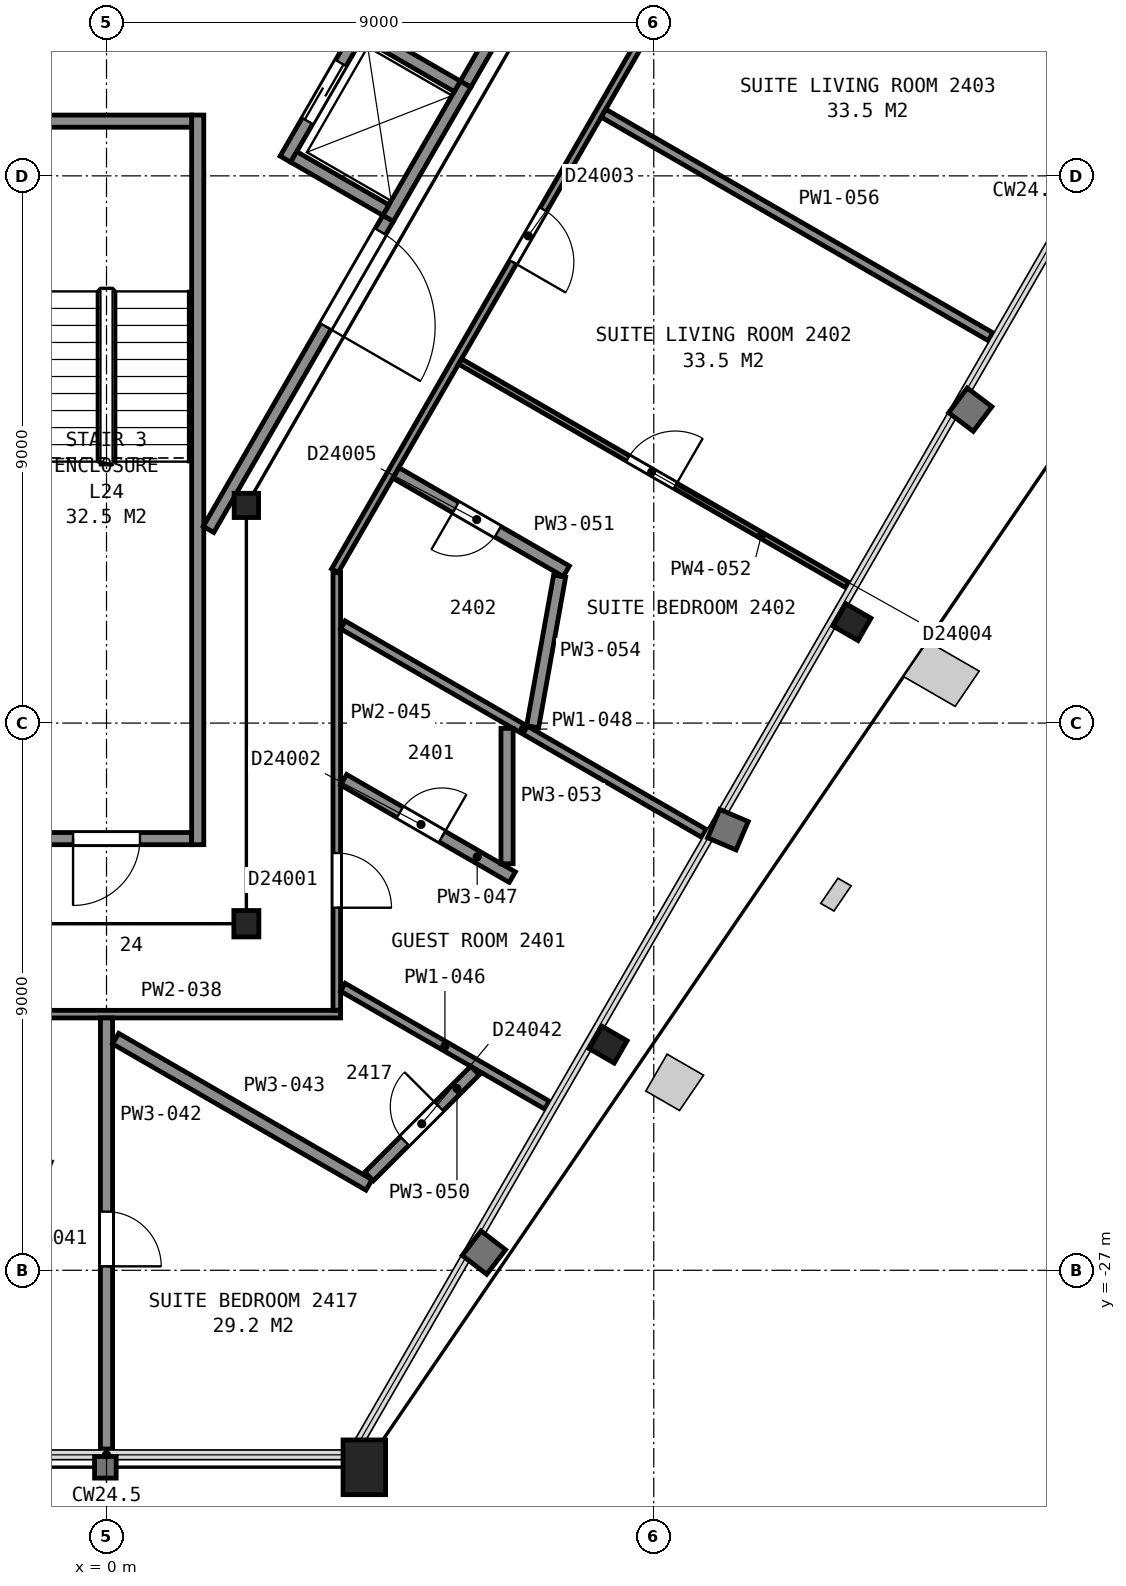
"""IFC4 building model, lengths in metres.
Left out: names, types, materials, properties, quantities, classifications, styles, units other than length and angle.
Written with IfcOpenShell. Run it as: python <this file> out.ifc"""

import sys

from ifc_helpers import new_model, si_unit, direction, frame, frame_2d, origin, origin_2d, place, context, subcontext, project, spatial, rectangle, hollow_rectangle, i_section, extrude, element, fill, save


model = new_model("IFC4")
c1 = context("Model", 3, precision=1e-05, world=origin(), true_north=direction((0.0, 1.0)))
c2 = subcontext(c1, "Body", "Model", "MODEL_VIEW")
j1 = project(units=[si_unit("LENGTHUNIT", "METRE"), si_unit("PLANEANGLEUNIT", "RADIAN")], contexts=[c1])
p1 = place(None, origin())
s1 = spatial("IfcSite", under=j1, at=p1, CompositionType="ELEMENT")
p2 = place(p1, origin())
s2 = spatial("IfcBuilding", under=s1, at=p2, CompositionType="ELEMENT")
p3 = place(p2, frame((0.0, 0.0, 103.6)))
s3 = spatial("IfcBuildingStorey", under=s2, at=p3, CompositionType="ELEMENT", Elevation=103.6)
p4 = place(p3, frame((4.24, -30.24, 0.075), z_axis=(0.0, 0.0, 1.0), x_axis=(-1.0, 0.0, 0.0)))
e1 = element("IfcColumn", 1, at=p4, inside=s3, PredefinedType="COLUMN", context=c2, shape_type="SweptSolid", body=[
    extrude(hollow_rectangle(XDim=0.7, YDim=0.9, WallThickness=0.065, at=origin_2d()), origin(), (0.0, 0.0, 1.0), 3.525),
])
p5 = place(p3, frame((8.25, -23.29, 0.045), z_axis=(0.0, 0.0, 1.0), x_axis=(-0.5, -0.866025403784, 0.0)))
e2 = element("IfcColumn", 2, at=p5, inside=s3, PredefinedType="COLUMN", context=c2, shape_type="SweptSolid", body=[
    extrude(i_section(OverallWidth=0.424, OverallDepth=0.475, WebThickness=0.048, FlangeThickness=0.077, FilletRadius=0.015, at=origin_2d()), origin(), (0.0, 0.0, 1.0), 3.555),
])
p6 = place(p3, frame((12.26, -16.34, 0.04), z_axis=(0.0, 0.0, 1.0), x_axis=(-0.5, -0.866025403784, 0.0)))
e3 = element("IfcColumn", 3, at=p6, inside=s3, PredefinedType="COLUMN", context=c2, shape_type="SweptSolid", body=[
    extrude(i_section(OverallWidth=0.424, OverallDepth=0.475, WebThickness=0.048, FlangeThickness=0.077, FilletRadius=0.015, at=origin_2d()), origin(), (0.0, 0.0, 1.0), 3.56),
])
p7 = place(p3, frame((2.3, -21.3, 0.0), z_axis=(0.0, 0.0, 1.0), x_axis=(-1.0, 0.0, 0.0)))
e4 = element("IfcColumn", 4, at=p7, inside=s3, PredefinedType="COLUMN", context=c2, shape_type="SweptSolid", body=[
    extrude(i_section(OverallWidth=0.411, OverallDepth=0.434, WebThickness=0.036, FlangeThickness=0.057, FilletRadius=0.015, at=origin_2d()), origin(), (0.0, 0.0, 1.0), 3.6),
])
p8 = place(p3, frame((2.3, -14.42, 0.0), z_axis=(0.0, 0.0, 1.0), x_axis=(1.0, 0.0, 0.0)))
e5 = element("IfcColumn", 5, at=p8, inside=s3, PredefinedType="COLUMN", context=c2, shape_type="SweptSolid", body=[
    extrude(i_section(OverallWidth=0.401, OverallDepth=0.399, WebThickness=0.025, FlangeThickness=0.04, FilletRadius=0.015, at=origin_2d()), origin(), (0.0, 0.0, 1.0), 3.6),
])
p9 = place(p3, frame((-1.4, -19.9, 0.0), z_axis=(0.0, 0.0, 1.0), x_axis=(1.0, 0.0, 0.0)))
e6 = element("IfcWall", 6, at=p9, inside=s3, PredefinedType="PARTITIONING", context=c2, shape_type="SweptSolid", body=[
    extrude(rectangle(XDim=2.8, YDim=0.2, at=frame_2d((1.4, 0.0))), origin(), (0.0, 0.0, 1.0), 3.35),
])
p10 = place(p9, frame((0.85, 0.0, 0.0)))
e7 = element("IfcOpeningElement", 7, at=p10, cuts=e6, PredefinedType="OPENING", context=c2, shape_type="SweptSolid", body=[
    extrude(rectangle(XDim=1.1, YDim=2.1, at=frame_2d((0.55, 1.05))), frame((0.0, 0.11, 0.0), z_axis=(0.0, -1.0, 0.0), x_axis=(1.0, 0.0, 0.0)), (0.0, 0.0, 1.0), 0.22),
])
p11 = place(p3, frame((1.5, -8.0, 0.0), z_axis=(0.0, 0.0, 1.0), x_axis=(0.0, -1.0, 0.0)))
e8 = element("IfcWall", 8, at=p11, inside=s3, PredefinedType="PARTITIONING", context=c2, shape_type="SweptSolid", body=[
    extrude(rectangle(XDim=12.0, YDim=0.2, at=frame_2d((6.0, 0.0))), origin(), (0.0, 0.0, 1.0), 3.35),
])
p12 = place(p3, frame((-1.4, -8.1, 0.0), z_axis=(0.0, 0.0, 1.0), x_axis=(1.0, 0.0, 0.0)))
e9 = element("IfcWall", 9, at=p12, inside=s3, PredefinedType="PARTITIONING", context=c2, shape_type="SweptSolid", body=[
    extrude(rectangle(XDim=2.8, YDim=0.2, at=frame_2d((1.4, 0.0))), origin(), (0.0, 0.0, 1.0), 3.35),
])
p13 = place(p3, frame((4.63, -9.7, 0.0), z_axis=(0.0, 0.0, 1.0), x_axis=(0.500062241894, 0.865989465428, 0.0)))
e10 = element("IfcWall", 10, at=p13, inside=s3, PredefinedType="PARTITIONING", context=c2, shape_type="SweptSolid", body=[
    extrude(rectangle(XDim=2.55, YDim=0.2, at=frame_2d((1.275, 0.0))), origin(), (0.0, 0.0, 1.0), 3.6),
])
p14 = place(p3, frame((2.942, -8.725, 0.0), z_axis=(0.0, 0.0, 1.0), x_axis=(0.500020783669, 0.866013403995, 0.0)))
e11 = element("IfcWall", 11, at=p14, inside=s3, PredefinedType="PARTITIONING", context=c2, shape_type="SweptSolid", body=[
    extrude(rectangle(XDim=2.55, YDim=0.2, at=frame_2d((1.275, 0.0))), origin(), (0.0, 0.0, 1.0), 3.6),
])
p15 = place(p14, frame((0.725, 0.0, 0.0)))
e12 = element("IfcOpeningElement", 12, at=p15, cuts=e11, PredefinedType="OPENING", context=c2, shape_type="SweptSolid", body=[
    extrude(rectangle(XDim=1.1, YDim=2.1, at=frame_2d((0.55, 1.05))), frame((0.0, 0.11, 0.0), z_axis=(0.0, -1.0, 0.0), x_axis=(1.0, 0.0, 0.0)), (0.0, 0.0, 1.0), 0.22),
])
p16 = place(p3, frame((5.769, -7.528, 0.0), z_axis=(0.0, 0.0, 1.0), x_axis=(-0.866002029911, 0.500040482552, 0.0)))
e13 = element("IfcWall", 13, at=p16, inside=s3, PredefinedType="PARTITIONING", context=c2, shape_type="SweptSolid", body=[
    extrude(rectangle(XDim=1.75, YDim=0.2, at=frame_2d((0.875, 0.0))), origin(), (0.0, 0.0, 1.0), 3.6),
])
p17 = place(p3, frame((4.594, -9.563, 0.0), z_axis=(0.0, 0.0, 1.0), x_axis=(-0.866036909293, 0.499980071345, 0.0)))
e14 = element("IfcWall", 14, at=p17, inside=s3, PredefinedType="PARTITIONING", context=c2, shape_type="SweptSolid", body=[
    extrude(rectangle(XDim=1.75, YDim=0.2, at=frame_2d((0.875, 0.0))), origin(), (0.0, 0.0, 1.0), 3.6),
])
p18 = place(p3, frame((1.677, -14.815, 0.0), z_axis=(0.0, 0.0, 1.0), x_axis=(0.49999445743, 0.866028603765, 0.0)))
e15 = element("IfcWall", 15, at=p18, inside=s3, PredefinedType="PARTITIONING", context=c2, shape_type="SweptSolid", body=[
    extrude(rectangle(XDim=5.905, YDim=0.2, at=frame_2d((2.952, 0.0))), origin(), (0.0, 0.0, 1.0), 3.35),
])
p19 = place(p18, frame((3.855, 0.0, 0.0)))
e16 = element("IfcOpeningElement", 16, at=p19, cuts=e15, PredefinedType="OPENING", context=c2, shape_type="SweptSolid", body=[
    extrude(rectangle(XDim=1.8, YDim=2.1, at=frame_2d((0.9, 1.05))), frame((0.0, 0.11, 0.0), z_axis=(0.0, -1.0, 0.0), x_axis=(1.0, 0.0, 0.0)), (0.0, 0.0, 1.0), 0.22),
])
p20 = place(p3, frame((5.906, -7.49, 0.0), z_axis=(0.0, 0.0, 1.0), x_axis=(0.500252727967, 0.865879442048, 0.0)))
e17 = element("IfcWall", 17, at=p20, inside=s3, PredefinedType="PARTITIONING", context=c2, shape_type="SweptSolid", body=[
    extrude(rectangle(XDim=2.617, YDim=0.2, at=frame_2d((1.309, 0.0))), origin(), (0.0, 0.0, 1.0), 3.35),
])
p21 = place(p3, frame((3.85, -22.787, 0.0), z_axis=(0.0, 0.0, 1.0), x_axis=(-1.0, 0.0, 0.0)))
e18 = element("IfcWall", 18, at=p21, inside=s3, PredefinedType="PARTITIONING", context=c2, shape_type="SweptSolid", body=[
    extrude(rectangle(XDim=7.699, YDim=0.125, at=frame_2d((3.85, 0.0))), origin(), (0.0, 0.0, 1.0), 2.613),
])
p22 = place(p21, frame((5.237, 0.0, 0.0)))
e19 = element("IfcOpeningElement", 19, at=p22, cuts=e18, PredefinedType="OPENING", context=c2, shape_type="SweptSolid", body=[
    extrude(rectangle(XDim=1.0, YDim=2.1, at=frame_2d((0.5, 1.05))), frame((0.0, 0.073, 0.0), z_axis=(0.0, -1.0, 0.0), x_axis=(1.0, 0.0, 0.0)), (0.0, 0.0, 1.0), 0.145),
])
p23 = place(p3, frame((0.0, -22.85, 0.0), z_axis=(0.0, 0.0, 1.0), x_axis=(0.0, -1.0, 0.0)))
e20 = element("IfcWall", 20, at=p23, inside=s3, PredefinedType="PARTITIONING", context=c2, shape_type="SweptSolid", body=[
    extrude(rectangle(XDim=7.089, YDim=0.2, at=frame_2d((3.545, 0.0))), origin(), (0.0, 0.0, 1.0), 2.613),
])
p24 = place(p23, frame((3.186, 0.0, 0.0)))
e21 = element("IfcOpeningElement", 21, at=p24, cuts=e20, PredefinedType="OPENING", context=c2, shape_type="SweptSolid", body=[
    extrude(rectangle(XDim=0.9, YDim=2.1, at=frame_2d((0.45, 1.05))), frame((0.0, 0.11, 0.0), z_axis=(0.0, -1.0, 0.0), x_axis=(1.0, 0.0, 0.0)), (0.0, 0.0, 1.0), 0.22),
])
p25 = place(p3, frame((0.15, -23.19, 0.0), z_axis=(0.0, 0.0, 1.0), x_axis=(0.866061372545, -0.499937695103, 0.0)))
e22 = element("IfcWall", 22, at=p25, inside=s3, PredefinedType="PARTITIONING", context=c2, shape_type="SweptSolid", body=[
    extrude(rectangle(XDim=4.811, YDim=0.2, at=frame_2d((2.406, 0.0))), origin(), (0.0, 0.0, 1.0), 2.613),
])
p26 = place(p3, frame((3.787, -15.525, 0.0), z_axis=(0.0, 0.0, 1.0), x_axis=(0.0, -1.0, 0.0)))
e23 = element("IfcWall", 23, at=p26, inside=s3, PredefinedType="PARTITIONING", context=c2, shape_type="SweptSolid", body=[
    extrude(rectangle(XDim=7.197, YDim=0.125, at=frame_2d((3.599, 0.0))), origin(), (0.0, 0.0, 1.0), 2.613),
])
p27 = place(p26, frame((4.612, 0.0, 0.0)))
e24 = element("IfcOpeningElement", 24, at=p27, cuts=e23, PredefinedType="OPENING", context=c2, shape_type="SweptSolid", body=[
    extrude(rectangle(XDim=0.9, YDim=2.1, at=frame_2d((0.45, 1.05))), frame((0.0, 0.073, 0.0), z_axis=(0.0, -1.0, 0.0), x_axis=(1.0, 0.0, 0.0)), (0.0, 0.0, 1.0), 0.145),
])
p28 = place(p3, frame((3.887, -22.345, 0.0), z_axis=(0.0, 0.0, 1.0), x_axis=(0.865997824551, -0.500047765591, 0.0)))
e25 = element("IfcWall", 25, at=p28, inside=s3, PredefinedType="PARTITIONING", context=c2, shape_type="SweptSolid", body=[
    extrude(rectangle(XDim=3.876, YDim=0.15, at=frame_2d((1.938, 0.0))), origin(), (0.0, 0.0, 1.0), 2.613),
])
p29 = place(p3, frame((3.899, -18.932, 0.0), z_axis=(0.0, 0.0, 1.0), x_axis=(0.865973625928, -0.500089671156, 0.0)))
e26 = element("IfcWall", 26, at=p29, inside=s3, PredefinedType="PARTITIONING", context=c2, shape_type="SweptSolid", body=[
    extrude(rectangle(XDim=3.204, YDim=0.2, at=frame_2d((1.602, 0.0))), origin(), (0.0, 0.0, 1.0), 2.613),
])
p30 = place(p29, frame((1.07, 0.0, 0.0)))
e27 = element("IfcOpeningElement", 27, at=p30, cuts=e26, PredefinedType="OPENING", context=c2, shape_type="SweptSolid", body=[
    extrude(rectangle(XDim=0.8, YDim=2.1, at=frame_2d((0.4, 1.05))), frame((0.0, 0.11, 0.0), z_axis=(0.0, -1.0, 0.0), x_axis=(1.0, 0.0, 0.0)), (0.0, 0.0, 1.0), 0.22),
])
p31 = place(p3, frame((3.887, -16.385, 0.0), z_axis=(0.0, 0.0, 1.0), x_axis=(0.86602133163, -0.500007053112, 0.0)))
e28 = element("IfcWall", 28, at=p31, inside=s3, PredefinedType="PARTITIONING", context=c2, shape_type="SweptSolid", body=[
    extrude(rectangle(XDim=6.856, YDim=0.15, at=frame_2d((3.428, 0.0))), origin(), (0.0, 0.0, 1.0), 2.613),
])
p32 = place(p3, frame((15.684, 5.165, 0.0), z_axis=(0.0, 0.0, 1.0), x_axis=(-0.500027787016, -0.866009360349, 0.0)))
e29 = element("IfcWall", 29, at=p32, inside=s3, PredefinedType="PARTITIONING", context=c2, shape_type="SweptSolid", body=[
    extrude(rectangle(XDim=23.856, YDim=0.125, at=frame_2d((11.928, 0.0))), origin(), (0.0, 0.0, 1.0), 2.613),
])
p33 = place(p32, frame((16.996, 0.0, 0.0)))
e30 = element("IfcOpeningElement", 30, at=p33, cuts=e29, PredefinedType="OPENING", context=c2, shape_type="SweptSolid", body=[
    extrude(rectangle(XDim=1.0, YDim=2.1, at=frame_2d((0.5, 1.05))), frame((0.0, 0.073, 0.0), z_axis=(0.0, -1.0, 0.0), x_axis=(1.0, 0.0, 0.0)), (0.0, 0.0, 1.0), 0.145),
])
p34 = place(p32, frame((12.28, 0.0, 0.0)))
e31 = element("IfcOpeningElement", 31, at=p34, cuts=e29, PredefinedType="OPENING", context=c2, shape_type="SweptSolid", body=[
    extrude(rectangle(XDim=1.0, YDim=2.1, at=frame_2d((0.5, 1.05))), frame((0.0, 0.073, 0.0), z_axis=(0.0, -1.0, 0.0), x_axis=(1.0, 0.0, 0.0)), (0.0, 0.0, 1.0), 0.145),
])
p35 = place(p3, frame((4.318, -25.457, 0.0), z_axis=(0.0, 0.0, 1.0), x_axis=(0.70690846209, 0.707305044677, 0.0)))
e32 = element("IfcWall", 32, at=p35, inside=s3, PredefinedType="PARTITIONING", context=c2, shape_type="SweptSolid", body=[
    extrude(rectangle(XDim=2.462, YDim=0.2, at=frame_2d((1.231, 0.0))), origin(), (0.0, 0.0, 1.0), 2.613),
])
p36 = place(p35, frame((0.825, 0.0, 0.0)))
e33 = element("IfcOpeningElement", 33, at=p36, cuts=e32, PredefinedType="OPENING", context=c2, shape_type="SweptSolid", body=[
    extrude(rectangle(XDim=0.8, YDim=2.1, at=frame_2d((0.4, 1.05))), frame((0.0, 0.11, 0.0), z_axis=(0.0, -1.0, 0.0), x_axis=(1.0, 0.0, 0.0)), (0.0, 0.0, 1.0), 0.22),
])
p37 = place(p3, frame((7.562, -15.503, 0.0), z_axis=(0.0, 0.0, 1.0), x_axis=(-0.866078705744, 0.499907666931, 0.0)))
e34 = element("IfcWall", 34, at=p37, inside=s3, PredefinedType="PARTITIONING", context=c2, shape_type="SweptSolid", body=[
    extrude(rectangle(XDim=3.233, YDim=0.2, at=frame_2d((1.616, 0.0))), origin(), (0.0, 0.0, 1.0), 2.613),
])
p38 = place(p37, frame((1.301, 0.0, 0.0)))
e35 = element("IfcOpeningElement", 35, at=p38, cuts=e34, PredefinedType="OPENING", context=c2, shape_type="SweptSolid", body=[
    extrude(rectangle(XDim=0.8, YDim=2.1, at=frame_2d((0.4, 1.05))), frame((0.0, 0.11, 0.0), z_axis=(0.0, -1.0, 0.0), x_axis=(1.0, 0.0, 0.0)), (0.0, 0.0, 1.0), 0.22),
])
p39 = place(p3, frame((12.183, -15.729, 0.0), z_axis=(0.0, 0.0, 1.0), x_axis=(-0.866066702559, 0.499928461601, 0.0)))
e36 = element("IfcWall", 36, at=p39, inside=s3, PredefinedType="PARTITIONING", context=c2, shape_type="SweptSolid", body=[
    extrude(rectangle(XDim=7.352, YDim=0.1, at=frame_2d((3.676, 0.0))), origin(), (0.0, 0.0, 1.0), 2.613),
])
p40 = place(p39, frame((3.265, 0.0, 0.0)))
e37 = element("IfcOpeningElement", 37, at=p40, cuts=e36, PredefinedType="OPENING", context=c2, shape_type="SweptSolid", body=[
    extrude(rectangle(XDim=0.9, YDim=2.1, at=frame_2d((0.45, 1.05))), frame((0.0, 0.06, 0.0), z_axis=(0.0, -1.0, 0.0), x_axis=(1.0, 0.0, 0.0)), (0.0, 0.0, 1.0), 0.12),
])
p41 = place(p3, frame((6.587, -20.314, 0.0), z_axis=(0.0, 0.0, 1.0), x_axis=(0.0, 1.0, 0.0)))
e38 = element("IfcWall", 38, at=p41, inside=s3, PredefinedType="PARTITIONING", context=c2, shape_type="SweptSolid", body=[
    extrude(rectangle(XDim=2.227, YDim=0.2, at=frame_2d((1.113, 0.0))), origin(), (0.0, 0.0, 1.0), 2.613),
])
p42 = place(p3, frame((7.007, -18.06, 0.0), z_axis=(0.0, 0.0, 1.0), x_axis=(0.176615903702, 0.984279849717, 0.0)))
e39 = element("IfcWall", 39, at=p42, inside=s3, PredefinedType="PARTITIONING", context=c2, shape_type="SweptSolid", body=[
    extrude(rectangle(XDim=2.519, YDim=0.2, at=frame_2d((1.259, 0.0))), origin(), (0.0, 0.0, 1.0), 2.613),
])
p43 = place(p3, frame((8.173, -7.969, 0.0), z_axis=(0.0, 0.0, 1.0), x_axis=(0.86596990005, -0.500096122968, 0.0)))
e40 = element("IfcWall", 40, at=p43, inside=s3, PredefinedType="PARTITIONING", context=c2, shape_type="SweptSolid", body=[
    extrude(rectangle(XDim=7.352, YDim=0.15, at=frame_2d((3.676, 0.0))), origin(), (0.0, 0.0, 1.0), 2.613),
])
p44 = place(p3, frame((10.53, -3.886, 0.0), z_axis=(0.0, 0.0, 1.0), x_axis=(0.8660606245, -0.499938990969, 0.0)))
e41 = element("IfcWall", 41, at=p44, inside=s3, PredefinedType="PARTITIONING", context=c2, shape_type="SweptSolid", body=[
    extrude(rectangle(XDim=7.353, YDim=0.1, at=frame_2d((3.676, 0.0))), origin(), (0.0, 0.0, 1.0), 2.613),
])
p45 = place(p44, frame((3.188, 0.0, 0.0)))
e42 = element("IfcOpeningElement", 42, at=p45, cuts=e41, PredefinedType="OPENING", context=c2, shape_type="SweptSolid", body=[
    extrude(rectangle(XDim=0.9, YDim=2.1, at=frame_2d((0.45, 1.05))), frame((0.0, 0.06, 0.0), z_axis=(0.0, -1.0, 0.0), x_axis=(1.0, 0.0, 0.0)), (0.0, 0.0, 1.0), 0.12),
])
p46 = place(p10, origin())
e43 = element("IfcDoor", 43, at=p46, inside=s3, OperationType="SINGLE_SWING_LEFT", PredefinedType="DOOR", context=c2, shape_type="SweptSolid", body=[
    extrude(rectangle(XDim=1.1, YDim=2.1, at=frame_2d((0.55, 1.05))), frame((0.0, 0.025, 0.0), z_axis=(0.0, -1.0, 0.0), x_axis=(1.0, 0.0, 0.0)), (0.0, 0.0, 1.0), 0.05),
])
fill(e7, e43)
p47 = place(p15, origin())
e44 = element("IfcDoor", 44, at=p47, inside=s3, OperationType="SLIDING_TO_RIGHT", PredefinedType="DOOR", context=c2, shape_type="SweptSolid", body=[
    extrude(rectangle(XDim=1.1, YDim=2.1, at=frame_2d((0.55, 1.05))), frame((0.0, 0.025, 0.0), z_axis=(0.0, -1.0, 0.0), x_axis=(1.0, 0.0, 0.0)), (0.0, 0.0, 1.0), 0.05),
])
fill(e12, e44)
p48 = place(p19, origin())
e45 = element("IfcDoor", 45, at=p48, inside=s3, OperationType="DOUBLE_DOOR_SINGLE_SWING", PredefinedType="DOOR", context=c2, shape_type="SweptSolid", body=[
    extrude(rectangle(XDim=1.8, YDim=2.1, at=frame_2d((0.9, 1.05))), frame((0.0, 0.025, 0.0), z_axis=(0.0, -1.0, 0.0), x_axis=(1.0, 0.0, 0.0)), (0.0, 0.0, 1.0), 0.05),
])
fill(e16, e45)
p49 = place(p24, origin())
e46 = element("IfcDoor", 46, at=p49, inside=s3, OperationType="SINGLE_SWING_RIGHT", PredefinedType="DOOR", context=c2, shape_type="SweptSolid", body=[
    extrude(rectangle(XDim=0.9, YDim=2.1, at=frame_2d((0.45, 1.05))), frame((0.0, 0.025, 0.0), z_axis=(0.0, -1.0, 0.0), x_axis=(1.0, 0.0, 0.0)), (0.0, 0.0, 1.0), 0.05),
])
fill(e21, e46)
p50 = place(p27, origin())
e47 = element("IfcDoor", 47, at=p50, inside=s3, OperationType="SINGLE_SWING_RIGHT", PredefinedType="DOOR", context=c2, shape_type="SweptSolid", body=[
    extrude(rectangle(XDim=0.9, YDim=2.1, at=frame_2d((0.45, 1.05))), frame((0.0, 0.025, 0.0), z_axis=(0.0, -1.0, 0.0), x_axis=(1.0, 0.0, 0.0)), (0.0, 0.0, 1.0), 0.05),
])
fill(e24, e47)
p51 = place(p30, origin())
e48 = element("IfcDoor", 48, at=p51, inside=s3, OperationType="SINGLE_SWING_RIGHT", PredefinedType="DOOR", context=c2, shape_type="SweptSolid", body=[
    extrude(rectangle(XDim=0.8, YDim=2.1, at=frame_2d((0.4, 1.05))), frame((0.0, 0.025, 0.0), z_axis=(0.0, -1.0, 0.0), x_axis=(1.0, 0.0, 0.0)), (0.0, 0.0, 1.0), 0.05),
])
fill(e27, e48)
p52 = place(p33, origin())
e49 = element("IfcDoor", 49, at=p52, inside=s3, OperationType="SINGLE_SWING_RIGHT", PredefinedType="DOOR", context=c2, shape_type="SweptSolid", body=[
    extrude(rectangle(XDim=1.0, YDim=2.1, at=frame_2d((0.5, 1.05))), frame((0.0, 0.025, 0.0), z_axis=(0.0, -1.0, 0.0), x_axis=(1.0, 0.0, 0.0)), (0.0, 0.0, 1.0), 0.05),
])
fill(e30, e49)
p53 = place(p36, origin())
e50 = element("IfcDoor", 50, at=p53, inside=s3, OperationType="SINGLE_SWING_RIGHT", PredefinedType="DOOR", context=c2, shape_type="SweptSolid", body=[
    extrude(rectangle(XDim=0.8, YDim=2.1, at=frame_2d((0.4, 1.05))), frame((0.0, 0.025, 0.0), z_axis=(0.0, -1.0, 0.0), x_axis=(1.0, 0.0, 0.0)), (0.0, 0.0, 1.0), 0.05),
])
fill(e33, e50)
p54 = place(p38, origin())
e51 = element("IfcDoor", 51, at=p54, inside=s3, OperationType="SINGLE_SWING_RIGHT", PredefinedType="DOOR", context=c2, shape_type="SweptSolid", body=[
    extrude(rectangle(XDim=0.8, YDim=2.1, at=frame_2d((0.4, 1.05))), frame((0.0, 0.025, 0.0), z_axis=(0.0, -1.0, 0.0), x_axis=(1.0, 0.0, 0.0)), (0.0, 0.0, 1.0), 0.05),
])
fill(e35, e51)
p55 = place(p40, origin())
e52 = element("IfcDoor", 52, at=p55, inside=s3, OperationType="SINGLE_SWING_LEFT", PredefinedType="DOOR", context=c2, shape_type="SweptSolid", body=[
    extrude(rectangle(XDim=0.9, YDim=2.1, at=frame_2d((0.45, 1.05))), frame((0.0, 0.025, 0.0), z_axis=(0.0, -1.0, 0.0), x_axis=(1.0, 0.0, 0.0)), (0.0, 0.0, 1.0), 0.05),
])
fill(e37, e52)
save(model, sys.argv[1])
